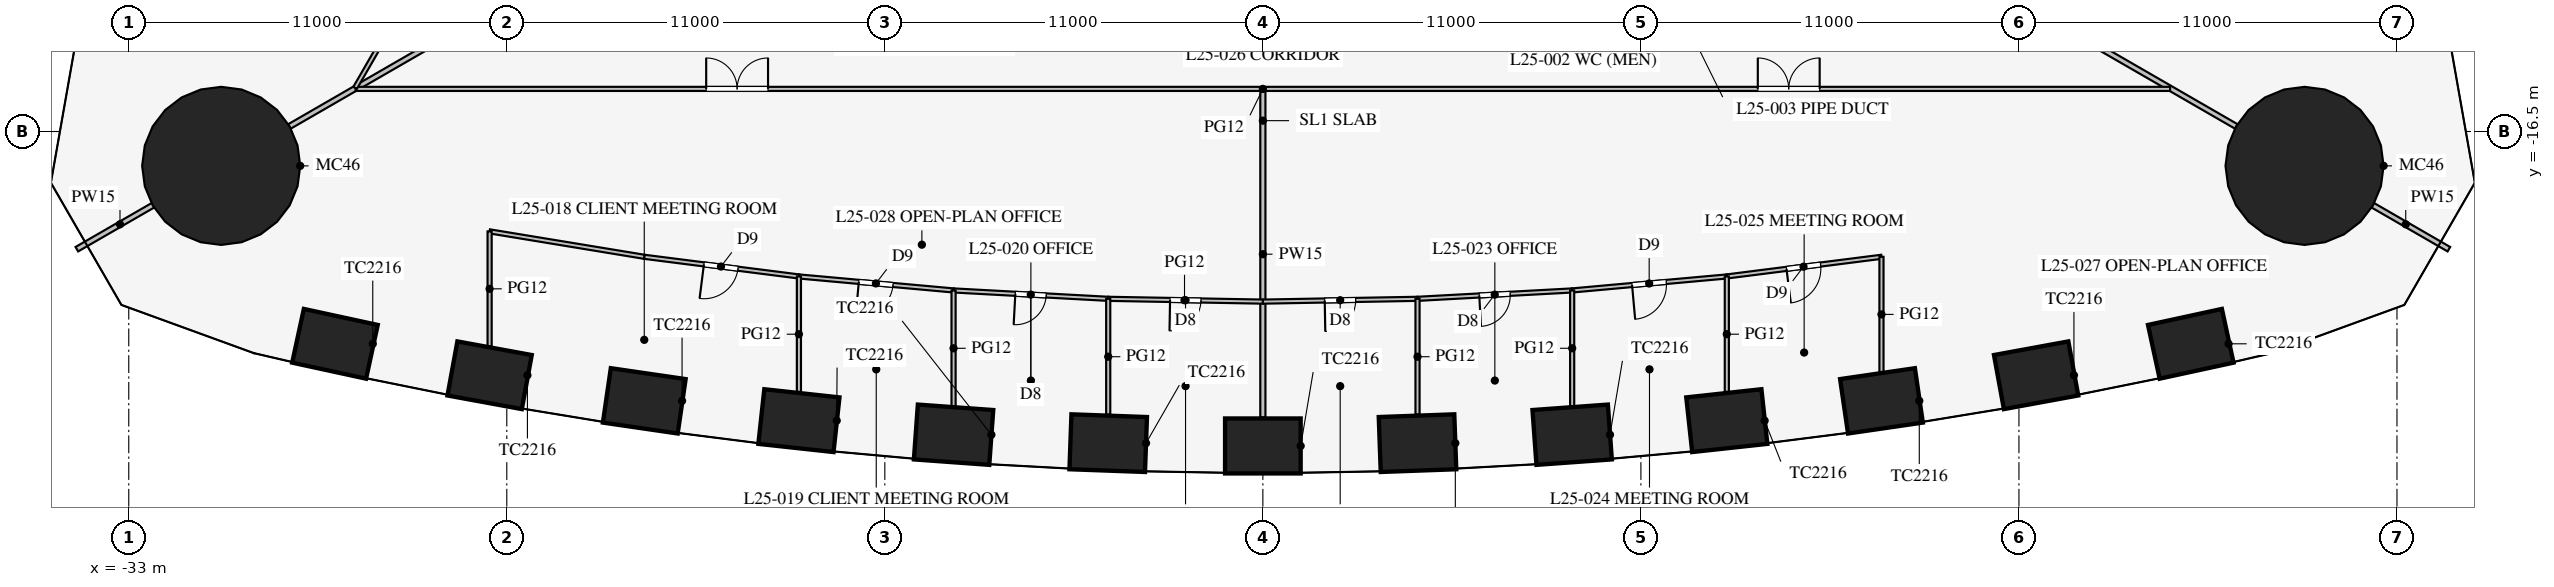
"""IFC4 building model, lengths in metres.
Left out: names, types, materials, properties, quantities, classifications, styles, units other than length and angle.
Written with IfcOpenShell. Run it as: python <this file> out.ifc"""

import sys

from ifc_helpers import new_model, si_unit, direction, frame, frame_2d, origin, origin_2d, place, context, subcontext, project, spatial, rectangle, circle, extrude, element, fill, save


model = new_model("IFC4")
c1 = context("Model", 3, precision=1e-05, world=origin(), true_north=direction((0.0, 1.0)))
c2 = subcontext(c1, "Body", "Model", "MODEL_VIEW")
j1 = project(units=[si_unit("LENGTHUNIT", "METRE"), si_unit("PLANEANGLEUNIT", "RADIAN")], contexts=[c1])
p1 = place(None, origin())
s1 = spatial("IfcSite", under=j1, at=p1, CompositionType="ELEMENT")
p2 = place(p1, origin())
s2 = spatial("IfcBuilding", under=s1, at=p2, CompositionType="ELEMENT")
p3 = place(p2, frame((0.0, 0.0, 111.5)))
s3 = spatial("IfcBuildingStorey", under=s2, at=p3, CompositionType="ELEMENT", Elevation=111.5)
for number, where, z_axis, x_axis in (
    (1, (-27.0, -22.677, 0.0), (0.0, 0.0, 1.0), (0.977, -0.212, 0.0)),
    (2, (-22.5, -23.593, 0.0), (0.0, 0.0, 1.0), (0.984, -0.18, 0.0)),
    (3, (-18.0, -24.337, 0.0), (0.0, 0.0, 1.0), (0.99, -0.144, 0.0)),
    (4, (-13.5, -24.913, 0.0), (0.0, 0.0, 1.0), (0.994, -0.108, 0.0)),
    (5, (-9.0, -25.323, 0.0), (0.0, 0.0, 1.0), (0.997, -0.072, 0.0)),
    (6, (-4.5, -25.568, 0.0), (0.0, 0.0, 1.0), (0.999, -0.036, 0.0)),
    (7, (0.0, -25.65, 0.0), (0.0, 0.0, 1.0), (1.0, 0.0, 0.0)),
    (8, (4.5, -25.568, 0.0), (0.0, 0.0, 1.0), (0.999, 0.036, 0.0)),
    (9, (9.0, -25.323, 0.0), (0.0, 0.0, 1.0), (0.997, 0.072, 0.0)),
    (10, (13.5, -24.913, 0.0), (0.0, 0.0, 1.0), (0.994, 0.108, 0.0)),
    (11, (18.0, -24.337, 0.0), (0.0, 0.0, 1.0), (0.99, 0.144, 0.0)),
    (12, (22.5, -23.593, 0.0), (0.0, 0.0, 1.0), (0.984, 0.18, 0.0)),
    (13, (27.0, -22.677, 0.0), (0.0, 0.0, 1.0), (0.977, 0.212, 0.0)),
):
    element("IfcColumn", number, at=place(p3, frame(where, z_axis=z_axis, x_axis=x_axis)), inside=s3, PredefinedType="COLUMN", context=c2, shape_type="SweptSolid", body=[
        extrude(rectangle(XDim=2.2, YDim=1.6, at=origin_2d()), origin(), (0.0, 0.0, 1.0), 4.2),
    ])
for number, where, z_axis, x_axis in (
    (14, (30.311, -17.5, 0.0), (0.0, 0.0, 1.0), (1.0, 0.0, 0.0)),
    (15, (-30.311, -17.5, 0.0), (0.0, 0.0, 1.0), (1.0, 0.0, 0.0)),
):
    element("IfcColumn", number, at=place(p3, frame(where, z_axis=z_axis, x_axis=x_axis)), inside=s3, PredefinedType="COLUMN", context=c2, shape_type="SweptSolid", body=[
        extrude(circle(Radius=2.3, at=origin_2d()), origin(), (0.0, 0.0, 1.0), 4.2),
    ])
p4 = place(p3, frame((14.203, -8.2, 0.0), z_axis=(0.0, 0.0, 1.0), x_axis=(0.866024668836, -0.500001272966, 0.0)))
e16 = element("IfcWall", 16, at=p4, inside=s3, PredefinedType="PARTITIONING", context=c2, shape_type="SweptSolid", body=[
    extrude(rectangle(XDim=16.65, YDim=0.15, at=frame_2d((8.325, 0.0))), origin(), (0.0, 0.0, 1.0), 2.3),
])
p5 = place(p3, frame((32.0, -18.475, 0.0), z_axis=(0.0, 0.0, 1.0), x_axis=(0.866042548026, -0.499970304126, 0.0)))
e17 = element("IfcWall", 17, at=p5, inside=s3, PredefinedType="PARTITIONING", context=c2, shape_type="SweptSolid", body=[
    extrude(rectangle(XDim=2.899, YDim=0.15, at=frame_2d((1.45, 0.0))), origin(), (0.0, 0.0, 1.0), 2.3),
])
p6 = place(p3, frame((-14.203, -8.2, 0.0), z_axis=(0.0, 0.0, 1.0), x_axis=(-0.866024668836, -0.500001272966, 0.0)))
e18 = element("IfcWall", 18, at=p6, inside=s3, PredefinedType="PARTITIONING", context=c2, shape_type="SweptSolid", body=[
    extrude(rectangle(XDim=16.65, YDim=0.15, at=frame_2d((8.325, 0.0))), origin(), (0.0, 0.0, 1.0), 2.3),
])
p7 = place(p3, frame((-32.0, -18.475, 0.0), z_axis=(0.0, 0.0, 1.0), x_axis=(-0.866042548026, -0.499970304126, 0.0)))
e19 = element("IfcWall", 19, at=p7, inside=s3, PredefinedType="PARTITIONING", context=c2, shape_type="SweptSolid", body=[
    extrude(rectangle(XDim=2.899, YDim=0.15, at=frame_2d((1.45, 0.0))), origin(), (0.0, 0.0, 1.0), 2.3),
])
p8 = place(p3, frame((0.0, -15.32, 0.0), z_axis=(0.0, 0.0, 1.0), x_axis=(0.0, -1.0, 0.0)))
e20 = element("IfcWall", 20, at=p8, inside=s3, PredefinedType="PARTITIONING", context=c2, shape_type="SweptSolid", body=[
    extrude(rectangle(XDim=9.5, YDim=0.15, at=frame_2d((4.75, 0.0))), origin(), (0.0, 0.0, 1.0), 2.8),
])
p9 = place(p3, frame((-26.398, -15.26, 0.0), z_axis=(0.0, 0.0, 1.0), x_axis=(1.0, 0.0, 0.0)))
e21 = element("IfcWall", 21, at=p9, inside=s3, PredefinedType="PARTITIONING", context=c2, shape_type="SweptSolid", body=[
    extrude(rectangle(XDim=52.796, YDim=0.12, at=frame_2d((26.398, 0.0))), origin(), (0.0, 0.0, 1.0), 2.9),
])
p10 = place(p9, frame((10.2, 0.0, 0.15)))
e22 = element("IfcOpeningElement", 22, at=p10, cuts=e21, PredefinedType="OPENING", context=c2, shape_type="SweptSolid", body=[
    extrude(rectangle(XDim=1.8, YDim=2.1, at=frame_2d((0.9, 1.05))), frame((0.0, 0.07, 0.0), z_axis=(0.0, -1.0, 0.0), x_axis=(1.0, 0.0, 0.0)), (0.0, 0.0, 1.0), 0.14),
])
p11 = place(p9, frame((40.8, 0.0, 0.15)))
e23 = element("IfcOpeningElement", 23, at=p11, cuts=e21, PredefinedType="OPENING", context=c2, shape_type="SweptSolid", body=[
    extrude(rectangle(XDim=1.8, YDim=2.1, at=frame_2d((0.9, 1.05))), frame((0.0, 0.07, 0.0), z_axis=(0.0, -1.0, 0.0), x_axis=(1.0, 0.0, 0.0)), (0.0, 0.0, 1.0), 0.14),
])
p12 = place(p3, frame((0.0, -21.45, 0.0), z_axis=(0.0, 0.0, 1.0), x_axis=(0.999837820638, 0.018009231578, 0.0)))
e24 = element("IfcWall", 24, at=p12, inside=s3, PredefinedType="PARTITIONING", context=c2, shape_type="SweptSolid", body=[
    extrude(rectangle(XDim=4.501, YDim=0.12, at=frame_2d((2.25, 0.0))), origin(), (0.0, 0.0, 1.0), 2.9),
])
p13 = place(p12, frame((1.8, 0.0, 0.15)))
e25 = element("IfcOpeningElement", 25, at=p13, cuts=e24, PredefinedType="OPENING", context=c2, shape_type="SweptSolid", body=[
    extrude(rectangle(XDim=0.9, YDim=2.1, at=frame_2d((0.45, 1.05))), frame((0.0, 0.07, 0.0), z_axis=(0.0, -1.0, 0.0), x_axis=(1.0, 0.0, 0.0)), (0.0, 0.0, 1.0), 0.14),
])
p14 = place(p3, frame((13.5, -20.718, 0.0), z_axis=(0.0, 0.0, 1.0), x_axis=(0.992010652594, 0.12615413247, 0.0)))
e26 = element("IfcWall", 26, at=p14, inside=s3, PredefinedType="PARTITIONING", context=c2, shape_type="SweptSolid", body=[
    extrude(rectangle(XDim=4.536, YDim=0.12, at=frame_2d((2.268, 0.0))), origin(), (0.0, 0.0, 1.0), 2.9),
])
p15 = place(p14, frame((1.75, 0.0, 0.15)))
e27 = element("IfcOpeningElement", 27, at=p15, cuts=e26, PredefinedType="OPENING", context=c2, shape_type="SweptSolid", body=[
    extrude(rectangle(XDim=1.0, YDim=2.1, at=frame_2d((0.5, 1.05))), frame((0.0, 0.07, 0.0), z_axis=(0.0, -1.0, 0.0), x_axis=(1.0, 0.0, 0.0)), (0.0, 0.0, 1.0), 0.14),
])
p16 = place(p3, frame((4.5, -21.369, 0.0), z_axis=(0.0, 0.0, 1.0), x_axis=(0.998537376538, 0.054065771581, 0.0)))
e28 = element("IfcWall", 28, at=p16, inside=s3, PredefinedType="PARTITIONING", context=c2, shape_type="SweptSolid", body=[
    extrude(rectangle(XDim=4.507, YDim=0.12, at=frame_2d((2.253, 0.0))), origin(), (0.0, 0.0, 1.0), 2.9),
])
p17 = place(p16, frame((1.8, 0.0, 0.15)))
e29 = element("IfcOpeningElement", 29, at=p17, cuts=e28, PredefinedType="OPENING", context=c2, shape_type="SweptSolid", body=[
    extrude(rectangle(XDim=0.9, YDim=2.1, at=frame_2d((0.45, 1.05))), frame((0.0, 0.07, 0.0), z_axis=(0.0, -1.0, 0.0), x_axis=(1.0, 0.0, 0.0)), (0.0, 0.0, 1.0), 0.14),
])
p18 = place(p3, frame((9.0, -21.125, 0.0), z_axis=(0.0, 0.0, 1.0), x_axis=(0.995930325215, 0.090126507295, 0.0)))
e30 = element("IfcWall", 30, at=p18, inside=s3, PredefinedType="PARTITIONING", context=c2, shape_type="SweptSolid", body=[
    extrude(rectangle(XDim=4.518, YDim=0.12, at=frame_2d((2.259, 0.0))), origin(), (0.0, 0.0, 1.0), 2.9),
])
p19 = place(p18, frame((1.75, 0.0, 0.15)))
e31 = element("IfcOpeningElement", 31, at=p19, cuts=e30, PredefinedType="OPENING", context=c2, shape_type="SweptSolid", body=[
    extrude(rectangle(XDim=1.0, YDim=2.1, at=frame_2d((0.5, 1.05))), frame((0.0, 0.07, 0.0), z_axis=(0.0, -1.0, 0.0), x_axis=(1.0, 0.0, 0.0)), (0.0, 0.0, 1.0), 0.14),
])
p20 = place(p3, frame((-13.5, -20.718, 0.0), z_axis=(0.0, 0.0, 1.0), x_axis=(0.995930325215, -0.090126507295, 0.0)))
e32 = element("IfcWall", 32, at=p20, inside=s3, PredefinedType="PARTITIONING", context=c2, shape_type="SweptSolid", body=[
    extrude(rectangle(XDim=4.518, YDim=0.12, at=frame_2d((2.259, 0.0))), origin(), (0.0, 0.0, 1.0), 2.9),
])
p21 = place(p20, frame((1.75, 0.0, 0.15)))
e33 = element("IfcOpeningElement", 33, at=p21, cuts=e32, PredefinedType="OPENING", context=c2, shape_type="SweptSolid", body=[
    extrude(rectangle(XDim=1.0, YDim=2.1, at=frame_2d((0.5, 1.05))), frame((0.0, 0.07, 0.0), z_axis=(0.0, -1.0, 0.0), x_axis=(1.0, 0.0, 0.0)), (0.0, 0.0, 1.0), 0.14),
])
p22 = place(p3, frame((-18.0, -20.146, 0.0), z_axis=(0.0, 0.0, 1.0), x_axis=(0.992010652594, -0.12615413247, 0.0)))
e34 = element("IfcWall", 34, at=p22, inside=s3, PredefinedType="PARTITIONING", context=c2, shape_type="SweptSolid", body=[
    extrude(rectangle(XDim=4.536, YDim=0.12, at=frame_2d((2.268, 0.0))), origin(), (0.0, 0.0, 1.0), 2.9),
])
p23 = place(p22, frame((1.75, 0.0, 0.15)))
e35 = element("IfcOpeningElement", 35, at=p23, cuts=e34, PredefinedType="OPENING", context=c2, shape_type="SweptSolid", body=[
    extrude(rectangle(XDim=1.0, YDim=2.1, at=frame_2d((0.5, 1.05))), frame((0.0, 0.07, 0.0), z_axis=(0.0, -1.0, 0.0), x_axis=(1.0, 0.0, 0.0)), (0.0, 0.0, 1.0), 0.14),
])
p24 = place(p3, frame((-22.5, -19.406, 0.0), z_axis=(0.0, 0.0, 1.0), x_axis=(0.986764681833, -0.162158757664, 0.0)))
e36 = element("IfcWall", 36, at=p24, inside=s3, PredefinedType="PARTITIONING", context=c2, shape_type="SweptSolid", body=[
    extrude(rectangle(XDim=4.56, YDim=0.12, at=frame_2d((2.28, 0.0))), origin(), (0.0, 0.0, 1.0), 2.9),
])
p25 = place(p3, frame((-4.5, -21.369, 0.0), z_axis=(0.0, 0.0, 1.0), x_axis=(0.999837820638, -0.018009231578, 0.0)))
e37 = element("IfcWall", 37, at=p25, inside=s3, PredefinedType="PARTITIONING", context=c2, shape_type="SweptSolid", body=[
    extrude(rectangle(XDim=4.501, YDim=0.12, at=frame_2d((2.25, 0.0))), origin(), (0.0, 0.0, 1.0), 2.9),
])
p26 = place(p25, frame((1.8, 0.0, 0.15)))
e38 = element("IfcOpeningElement", 38, at=p26, cuts=e37, PredefinedType="OPENING", context=c2, shape_type="SweptSolid", body=[
    extrude(rectangle(XDim=0.9, YDim=2.1, at=frame_2d((0.45, 1.05))), frame((0.0, 0.07, 0.0), z_axis=(0.0, -1.0, 0.0), x_axis=(1.0, 0.0, 0.0)), (0.0, 0.0, 1.0), 0.14),
])
p27 = place(p3, frame((-9.0, -21.125, 0.0), z_axis=(0.0, 0.0, 1.0), x_axis=(0.998537376538, -0.054065771581, 0.0)))
e39 = element("IfcWall", 39, at=p27, inside=s3, PredefinedType="PARTITIONING", context=c2, shape_type="SweptSolid", body=[
    extrude(rectangle(XDim=4.507, YDim=0.12, at=frame_2d((2.253, 0.0))), origin(), (0.0, 0.0, 1.0), 2.9),
])
p28 = place(p27, frame((1.8, 0.0, 0.15)))
e40 = element("IfcOpeningElement", 40, at=p28, cuts=e39, PredefinedType="OPENING", context=c2, shape_type="SweptSolid", body=[
    extrude(rectangle(XDim=0.9, YDim=2.1, at=frame_2d((0.45, 1.05))), frame((0.0, 0.07, 0.0), z_axis=(0.0, -1.0, 0.0), x_axis=(1.0, 0.0, 0.0)), (0.0, 0.0, 1.0), 0.14),
])
p29 = place(p3, frame((13.5, -20.718, 0.0), z_axis=(0.0, 0.0, 1.0), x_axis=(0.0, -1.0, 0.0)))
e41 = element("IfcWall", 41, at=p29, inside=s3, PredefinedType="PARTITIONING", context=c2, shape_type="SweptSolid", body=[
    extrude(rectangle(XDim=3.36, YDim=0.12, at=frame_2d((1.68, 0.0))), origin(), (0.0, 0.0, 1.0), 2.6),
])
p30 = place(p3, frame((18.0, -20.146, 0.0), z_axis=(0.0, 0.0, 1.0), x_axis=(0.0, -1.0, 0.0)))
e42 = element("IfcWall", 42, at=p30, inside=s3, PredefinedType="PARTITIONING", context=c2, shape_type="SweptSolid", body=[
    extrude(rectangle(XDim=3.353, YDim=0.12, at=frame_2d((1.677, 0.0))), origin(), (0.0, 0.0, 1.0), 2.8),
])
p31 = place(p3, frame((4.5, -21.369, 0.0), z_axis=(0.0, 0.0, 1.0), x_axis=(0.0, -1.0, 0.0)))
e43 = element("IfcWall", 43, at=p31, inside=s3, PredefinedType="PARTITIONING", context=c2, shape_type="SweptSolid", body=[
    extrude(rectangle(XDim=3.369, YDim=0.12, at=frame_2d((1.685, 0.0))), origin(), (0.0, 0.0, 1.0), 2.8),
])
p32 = place(p3, frame((9.0, -21.125, 0.0), z_axis=(0.0, 0.0, 1.0), x_axis=(0.0, -1.0, 0.0)))
e44 = element("IfcWall", 44, at=p32, inside=s3, PredefinedType="PARTITIONING", context=c2, shape_type="SweptSolid", body=[
    extrude(rectangle(XDim=3.366, YDim=0.12, at=frame_2d((1.683, 0.0))), origin(), (0.0, 0.0, 1.0), 2.9),
])
p33 = place(p3, frame((-13.5, -20.718, 0.0), z_axis=(0.0, 0.0, 1.0), x_axis=(0.0, -1.0, 0.0)))
e45 = element("IfcWall", 45, at=p33, inside=s3, PredefinedType="PARTITIONING", context=c2, shape_type="SweptSolid", body=[
    extrude(rectangle(XDim=3.36, YDim=0.12, at=frame_2d((1.68, 0.0))), origin(), (0.0, 0.0, 1.0), 2.6),
])
p34 = place(p3, frame((-22.5, -19.406, 0.0), z_axis=(0.0, 0.0, 1.0), x_axis=(0.0, -1.0, 0.0)))
e46 = element("IfcWall", 46, at=p34, inside=s3, PredefinedType="PARTITIONING", context=c2, shape_type="SweptSolid", body=[
    extrude(rectangle(XDim=3.343, YDim=0.12, at=frame_2d((1.671, 0.0))), origin(), (0.0, 0.0, 1.0), 2.9),
])
p35 = place(p3, frame((-4.5, -21.369, 0.0), z_axis=(0.0, 0.0, 1.0), x_axis=(0.0, -1.0, 0.0)))
e47 = element("IfcWall", 47, at=p35, inside=s3, PredefinedType="PARTITIONING", context=c2, shape_type="SweptSolid", body=[
    extrude(rectangle(XDim=3.369, YDim=0.12, at=frame_2d((1.685, 0.0))), origin(), (0.0, 0.0, 1.0), 2.8),
])
p36 = place(p3, frame((-9.0, -21.125, 0.0), z_axis=(0.0, 0.0, 1.0), x_axis=(0.0, -1.0, 0.0)))
e48 = element("IfcWall", 48, at=p36, inside=s3, PredefinedType="PARTITIONING", context=c2, shape_type="SweptSolid", body=[
    extrude(rectangle(XDim=3.366, YDim=0.12, at=frame_2d((1.683, 0.0))), origin(), (0.0, 0.0, 1.0), 2.9),
])
p37 = place(p3, frame((-0.016, 30.491, 0.0), z_axis=(0.0, 0.0, 1.0), x_axis=(-0.50000091641, -0.866024874695, 0.0)))
e49 = element("IfcWall", 49, at=p37, inside=s3, PredefinedType="PARTITIONING", context=c2, shape_type="SweptSolid", body=[
    extrude(rectangle(XDim=52.796, YDim=0.12, at=frame_2d((26.398, 0.0))), origin(), (0.0, 0.0, 1.0), 2.9),
])
p38 = place(p37, frame((10.2, 0.0, 0.15)))
e50 = element("IfcOpeningElement", 50, at=p38, cuts=e49, PredefinedType="OPENING", context=c2, shape_type="SweptSolid", body=[
    extrude(rectangle(XDim=1.8, YDim=2.1, at=frame_2d((0.9, 1.05))), frame((0.0, 0.07, 0.0), z_axis=(0.0, -1.0, 0.0), x_axis=(1.0, 0.0, 0.0)), (0.0, 0.0, 1.0), 0.14),
])
p39 = place(p37, frame((40.8, 0.0, 0.15)))
e51 = element("IfcOpeningElement", 51, at=p39, cuts=e49, PredefinedType="OPENING", context=c2, shape_type="SweptSolid", body=[
    extrude(rectangle(XDim=1.8, YDim=2.1, at=frame_2d((0.9, 1.05))), frame((0.0, 0.07, 0.0), z_axis=(0.0, -1.0, 0.0), x_axis=(1.0, 0.0, 0.0)), (0.0, 0.0, 1.0), 0.14),
])
p40 = place(p23, frame((1.0, 0.0, 0.0), z_axis=(0.0, 0.0, 1.0), x_axis=(-1.0, 0.0, 0.0)))
e52 = element("IfcDoor", 52, at=p40, inside=s3, OperationType="SINGLE_SWING_RIGHT", PredefinedType="DOOR", context=c2, shape_type="SweptSolid", body=[
    extrude(rectangle(XDim=1.0, YDim=2.1, at=frame_2d((0.5, 1.05))), frame((0.0, 0.025, 0.0), z_axis=(0.0, -1.0, 0.0), x_axis=(1.0, 0.0, 0.0)), (0.0, 0.0, 1.0), 0.05),
])
fill(e35, e52)
p41 = place(p21, frame((1.0, 0.0, 0.0), z_axis=(0.0, 0.0, 1.0), x_axis=(-1.0, 0.0, 0.0)))
e53 = element("IfcDoor", 53, at=p41, inside=s3, OperationType="SINGLE_SWING_RIGHT", PredefinedType="DOOR", context=c2, shape_type="SweptSolid", body=[
    extrude(rectangle(XDim=1.0, YDim=2.1, at=frame_2d((0.5, 1.05))), frame((0.0, 0.025, 0.0), z_axis=(0.0, -1.0, 0.0), x_axis=(1.0, 0.0, 0.0)), (0.0, 0.0, 1.0), 0.05),
])
fill(e33, e53)
p42 = place(p28, frame((0.9, 0.0, 0.0), z_axis=(0.0, 0.0, 1.0), x_axis=(-1.0, 0.0, 0.0)))
e54 = element("IfcDoor", 54, at=p42, inside=s3, OperationType="SINGLE_SWING_RIGHT", PredefinedType="DOOR", context=c2, shape_type="SweptSolid", body=[
    extrude(rectangle(XDim=0.9, YDim=2.1, at=frame_2d((0.45, 1.05))), frame((0.0, 0.025, 0.0), z_axis=(0.0, -1.0, 0.0), x_axis=(1.0, 0.0, 0.0)), (0.0, 0.0, 1.0), 0.05),
])
fill(e40, e54)
p43 = place(p26, frame((0.9, 0.0, 0.0), z_axis=(0.0, 0.0, 1.0), x_axis=(-1.0, 0.0, 0.0)))
e55 = element("IfcDoor", 55, at=p43, inside=s3, OperationType="SINGLE_SWING_RIGHT", PredefinedType="DOOR", context=c2, shape_type="SweptSolid", body=[
    extrude(rectangle(XDim=0.9, YDim=2.1, at=frame_2d((0.45, 1.05))), frame((0.0, 0.025, 0.0), z_axis=(0.0, -1.0, 0.0), x_axis=(1.0, 0.0, 0.0)), (0.0, 0.0, 1.0), 0.05),
])
fill(e38, e55)
p44 = place(p13, frame((0.9, 0.0, 0.0), z_axis=(0.0, 0.0, 1.0), x_axis=(-1.0, 0.0, 0.0)))
e56 = element("IfcDoor", 56, at=p44, inside=s3, OperationType="SINGLE_SWING_RIGHT", PredefinedType="DOOR", context=c2, shape_type="SweptSolid", body=[
    extrude(rectangle(XDim=0.9, YDim=2.1, at=frame_2d((0.45, 1.05))), frame((0.0, 0.025, 0.0), z_axis=(0.0, -1.0, 0.0), x_axis=(1.0, 0.0, 0.0)), (0.0, 0.0, 1.0), 0.05),
])
fill(e25, e56)
p45 = place(p17, frame((0.9, 0.0, 0.0), z_axis=(0.0, 0.0, 1.0), x_axis=(-1.0, 0.0, 0.0)))
e57 = element("IfcDoor", 57, at=p45, inside=s3, OperationType="SINGLE_SWING_RIGHT", PredefinedType="DOOR", context=c2, shape_type="SweptSolid", body=[
    extrude(rectangle(XDim=0.9, YDim=2.1, at=frame_2d((0.45, 1.05))), frame((0.0, 0.025, 0.0), z_axis=(0.0, -1.0, 0.0), x_axis=(1.0, 0.0, 0.0)), (0.0, 0.0, 1.0), 0.05),
])
fill(e29, e57)
p46 = place(p19, frame((1.0, 0.0, 0.0), z_axis=(0.0, 0.0, 1.0), x_axis=(-1.0, 0.0, 0.0)))
e58 = element("IfcDoor", 58, at=p46, inside=s3, OperationType="SINGLE_SWING_RIGHT", PredefinedType="DOOR", context=c2, shape_type="SweptSolid", body=[
    extrude(rectangle(XDim=1.0, YDim=2.1, at=frame_2d((0.5, 1.05))), frame((0.0, 0.025, 0.0), z_axis=(0.0, -1.0, 0.0), x_axis=(1.0, 0.0, 0.0)), (0.0, 0.0, 1.0), 0.05),
])
fill(e31, e58)
p47 = place(p15, frame((1.0, 0.0, 0.0), z_axis=(0.0, 0.0, 1.0), x_axis=(-1.0, 0.0, 0.0)))
e59 = element("IfcDoor", 59, at=p47, inside=s3, OperationType="SINGLE_SWING_RIGHT", PredefinedType="DOOR", context=c2, shape_type="SweptSolid", body=[
    extrude(rectangle(XDim=1.0, YDim=2.1, at=frame_2d((0.5, 1.05))), frame((0.0, 0.025, 0.0), z_axis=(0.0, -1.0, 0.0), x_axis=(1.0, 0.0, 0.0)), (0.0, 0.0, 1.0), 0.05),
])
fill(e27, e59)
p48 = place(p10, origin())
e60 = element("IfcDoor", 60, at=p48, inside=s3, OperationType="DOUBLE_DOOR_SINGLE_SWING", PredefinedType="DOOR", context=c2, shape_type="SweptSolid", body=[
    extrude(rectangle(XDim=1.8, YDim=2.1, at=frame_2d((0.9, 1.05))), frame((0.0, 0.025, 0.0), z_axis=(0.0, -1.0, 0.0), x_axis=(1.0, 0.0, 0.0)), (0.0, 0.0, 1.0), 0.05),
])
fill(e22, e60)
p49 = place(p11, origin())
e61 = element("IfcDoor", 61, at=p49, inside=s3, OperationType="DOUBLE_DOOR_SINGLE_SWING", PredefinedType="DOOR", context=c2, shape_type="SweptSolid", body=[
    extrude(rectangle(XDim=1.8, YDim=2.1, at=frame_2d((0.9, 1.05))), frame((0.0, 0.025, 0.0), z_axis=(0.0, -1.0, 0.0), x_axis=(1.0, 0.0, 0.0)), (0.0, 0.0, 1.0), 0.05),
])
fill(e23, e61)
save(model, sys.argv[1])
